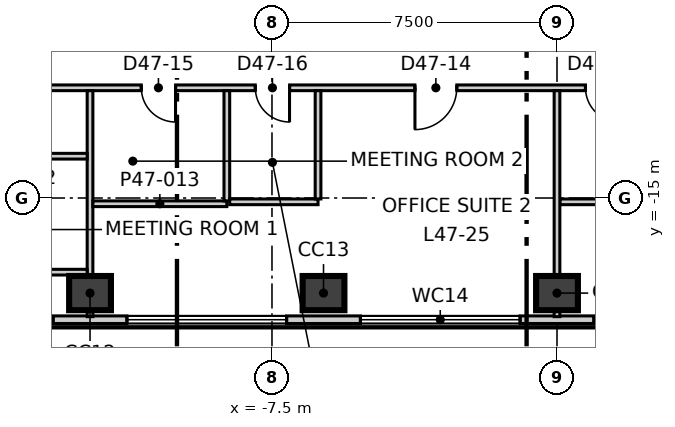
"""IFC4 building model, lengths in metres.
Left out: names, types, materials, properties, quantities, classifications, styles, units other than length and angle.
Written with IfcOpenShell. Run it as: python <this file> out.ifc"""

import sys

from ifc_helpers import new_model, si_unit, direction, frame, frame_2d, origin, origin_2d, place, context, subcontext, project, spatial, rectangle, extrude, element, fill, save


model = new_model("IFC4")
c1 = context("Model", 3, precision=1e-05, world=origin(), true_north=direction((0.0, 1.0)))
c2 = subcontext(c1, "Body", "Model", "MODEL_VIEW")
j1 = project(units=[si_unit("LENGTHUNIT", "METRE"), si_unit("PLANEANGLEUNIT", "RADIAN")], contexts=[c1])
p1 = place(None, origin())
s1 = spatial("IfcSite", under=j1, at=p1, CompositionType="ELEMENT")
p2 = place(p1, origin())
s2 = spatial("IfcBuilding", under=s1, at=p2, CompositionType="ELEMENT")
p3 = place(p2, frame((0.0, 0.0, 203.3)))
s3 = spatial("IfcBuildingStorey", under=s2, at=p3, CompositionType="ELEMENT", Elevation=203.3)
for number, where, z_axis, x_axis in (
    (1, (-12.288, -17.502, -0.3), (0.0, 0.0, 1.0), (1.0, 0.0, 0.0)),
    (2, (-6.144, -17.502, -0.3), (0.0, 0.0, 1.0), (1.0, 0.0, 0.0)),
    (3, (0.0, -17.502, -0.3), (0.0, 0.0, 1.0), (1.0, 0.0, 0.0)),
):
    element("IfcColumn", number, at=place(p3, frame(where, z_axis=z_axis, x_axis=x_axis)), inside=s3, PredefinedType="COLUMN", context=c2, shape_type="SweptSolid", body=[
        extrude(rectangle(XDim=1.1, YDim=0.9, at=origin_2d()), origin(), (0.0, 0.0, 1.0), 4.0),
    ])
p4 = place(p3, frame((-2.824, 31.513, 0.0), z_axis=(0.0, 0.0, 1.0), x_axis=(-0.500012324412, -0.866018288165, 0.0)))
e4 = element("IfcWall", 4, at=p4, inside=s3, PredefinedType="ELEMENTEDWALL", context=c2, shape_type="SweptSolid", body=[
    extrude(rectangle(XDim=51.739, YDim=0.2, at=frame_2d((25.87, 0.0))), origin(), (0.0, 0.0, 1.0), 3.7),
])
p5 = place(p4, frame((2.275, 0.0, 0.9)))
e5 = element("IfcOpeningElement", 5, at=p5, cuts=e4, PredefinedType="OPENING", context=c2, shape_type="SweptSolid", body=[
    extrude(rectangle(XDim=4.2, YDim=2.5, at=frame_2d((2.1, 1.25))), frame((0.0, 0.11, 0.0), z_axis=(0.0, -1.0, 0.0), x_axis=(1.0, 0.0, 0.0)), (0.0, 0.0, 1.0), 0.22),
])
p6 = place(p4, frame((8.419, 0.0, 0.9)))
e6 = element("IfcOpeningElement", 6, at=p6, cuts=e4, PredefinedType="OPENING", context=c2, shape_type="SweptSolid", body=[
    extrude(rectangle(XDim=4.2, YDim=2.5, at=frame_2d((2.1, 1.25))), frame((0.0, 0.11, 0.0), z_axis=(0.0, -1.0, 0.0), x_axis=(1.0, 0.0, 0.0)), (0.0, 0.0, 1.0), 0.22),
])
p7 = place(p4, frame((14.563, 0.0, 0.9)))
e7 = element("IfcOpeningElement", 7, at=p7, cuts=e4, PredefinedType="OPENING", context=c2, shape_type="SweptSolid", body=[
    extrude(rectangle(XDim=4.2, YDim=2.5, at=frame_2d((2.1, 1.25))), frame((0.0, 0.11, 0.0), z_axis=(0.0, -1.0, 0.0), x_axis=(1.0, 0.0, 0.0)), (0.0, 0.0, 1.0), 0.22),
])
p8 = place(p4, frame((20.707, 0.0, 0.9)))
e8 = element("IfcOpeningElement", 8, at=p8, cuts=e4, PredefinedType="OPENING", context=c2, shape_type="SweptSolid", body=[
    extrude(rectangle(XDim=4.2, YDim=2.5, at=frame_2d((2.1, 1.25))), frame((0.0, 0.11, 0.0), z_axis=(0.0, -1.0, 0.0), x_axis=(1.0, 0.0, 0.0)), (0.0, 0.0, 1.0), 0.22),
])
p9 = place(p4, frame((26.851, 0.0, 0.9)))
e9 = element("IfcOpeningElement", 9, at=p9, cuts=e4, PredefinedType="OPENING", context=c2, shape_type="SweptSolid", body=[
    extrude(rectangle(XDim=4.2, YDim=2.5, at=frame_2d((2.1, 1.25))), frame((0.0, 0.11, 0.0), z_axis=(0.0, -1.0, 0.0), x_axis=(1.0, 0.0, 0.0)), (0.0, 0.0, 1.0), 0.22),
])
p10 = place(p4, frame((32.995, 0.0, 0.9)))
e10 = element("IfcOpeningElement", 10, at=p10, cuts=e4, PredefinedType="OPENING", context=c2, shape_type="SweptSolid", body=[
    extrude(rectangle(XDim=4.2, YDim=2.5, at=frame_2d((2.1, 1.25))), frame((0.0, 0.11, 0.0), z_axis=(0.0, -1.0, 0.0), x_axis=(1.0, 0.0, 0.0)), (0.0, 0.0, 1.0), 0.22),
])
p11 = place(p4, frame((39.14, 0.0, 0.9)))
e11 = element("IfcOpeningElement", 11, at=p11, cuts=e4, PredefinedType="OPENING", context=c2, shape_type="SweptSolid", body=[
    extrude(rectangle(XDim=4.2, YDim=2.5, at=frame_2d((2.1, 1.25))), frame((0.0, 0.11, 0.0), z_axis=(0.0, -1.0, 0.0), x_axis=(1.0, 0.0, 0.0)), (0.0, 0.0, 1.0), 0.22),
])
p12 = place(p4, frame((45.284, 0.0, 0.9)))
e12 = element("IfcOpeningElement", 12, at=p12, cuts=e4, PredefinedType="OPENING", context=c2, shape_type="SweptSolid", body=[
    extrude(rectangle(XDim=4.2, YDim=2.5, at=frame_2d((2.1, 1.25))), frame((0.0, 0.11, 0.0), z_axis=(0.0, -1.0, 0.0), x_axis=(1.0, 0.0, 0.0)), (0.0, 0.0, 1.0), 0.22),
])
p13 = place(p3, frame((-25.88, -18.202, 0.0), z_axis=(0.0, 0.0, 1.0), x_axis=(1.0, 0.0, 0.0)))
e13 = element("IfcWall", 13, at=p13, inside=s3, PredefinedType="ELEMENTEDWALL", context=c2, shape_type="SweptSolid", body=[
    extrude(rectangle(XDim=51.74, YDim=0.2, at=frame_2d((25.87, 0.0))), origin(), (0.0, 0.0, 1.0), 3.7),
])
p14 = place(p13, frame((2.275, 0.0, 0.9)))
e14 = element("IfcOpeningElement", 14, at=p14, cuts=e13, PredefinedType="OPENING", context=c2, shape_type="SweptSolid", body=[
    extrude(rectangle(XDim=4.2, YDim=2.5, at=frame_2d((2.1, 1.25))), frame((0.0, 0.11, 0.0), z_axis=(0.0, -1.0, 0.0), x_axis=(1.0, 0.0, 0.0)), (0.0, 0.0, 1.0), 0.22),
])
p15 = place(p13, frame((8.419, 0.0, 0.9)))
e15 = element("IfcOpeningElement", 15, at=p15, cuts=e13, PredefinedType="OPENING", context=c2, shape_type="SweptSolid", body=[
    extrude(rectangle(XDim=4.2, YDim=2.5, at=frame_2d((2.1, 1.25))), frame((0.0, 0.11, 0.0), z_axis=(0.0, -1.0, 0.0), x_axis=(1.0, 0.0, 0.0)), (0.0, 0.0, 1.0), 0.22),
])
p16 = place(p13, frame((14.564, 0.0, 0.9)))
e16 = element("IfcOpeningElement", 16, at=p16, cuts=e13, PredefinedType="OPENING", context=c2, shape_type="SweptSolid", body=[
    extrude(rectangle(XDim=4.2, YDim=2.5, at=frame_2d((2.1, 1.25))), frame((0.0, 0.11, 0.0), z_axis=(0.0, -1.0, 0.0), x_axis=(1.0, 0.0, 0.0)), (0.0, 0.0, 1.0), 0.22),
])
p17 = place(p13, frame((20.708, 0.0, 0.9)))
e17 = element("IfcOpeningElement", 17, at=p17, cuts=e13, PredefinedType="OPENING", context=c2, shape_type="SweptSolid", body=[
    extrude(rectangle(XDim=4.2, YDim=2.5, at=frame_2d((2.1, 1.25))), frame((0.0, 0.11, 0.0), z_axis=(0.0, -1.0, 0.0), x_axis=(1.0, 0.0, 0.0)), (0.0, 0.0, 1.0), 0.22),
])
p18 = place(p13, frame((26.852, 0.0, 0.9)))
e18 = element("IfcOpeningElement", 18, at=p18, cuts=e13, PredefinedType="OPENING", context=c2, shape_type="SweptSolid", body=[
    extrude(rectangle(XDim=4.2, YDim=2.5, at=frame_2d((2.1, 1.25))), frame((0.0, 0.11, 0.0), z_axis=(0.0, -1.0, 0.0), x_axis=(1.0, 0.0, 0.0)), (0.0, 0.0, 1.0), 0.22),
])
p19 = place(p13, frame((32.996, 0.0, 0.9)))
e19 = element("IfcOpeningElement", 19, at=p19, cuts=e13, PredefinedType="OPENING", context=c2, shape_type="SweptSolid", body=[
    extrude(rectangle(XDim=4.2, YDim=2.5, at=frame_2d((2.1, 1.25))), frame((0.0, 0.11, 0.0), z_axis=(0.0, -1.0, 0.0), x_axis=(1.0, 0.0, 0.0)), (0.0, 0.0, 1.0), 0.22),
])
p20 = place(p13, frame((39.141, 0.0, 0.9)))
e20 = element("IfcOpeningElement", 20, at=p20, cuts=e13, PredefinedType="OPENING", context=c2, shape_type="SweptSolid", body=[
    extrude(rectangle(XDim=4.2, YDim=2.5, at=frame_2d((2.1, 1.25))), frame((0.0, 0.11, 0.0), z_axis=(0.0, -1.0, 0.0), x_axis=(1.0, 0.0, 0.0)), (0.0, 0.0, 1.0), 0.22),
])
p21 = place(p13, frame((45.285, 0.0, 0.9)))
e21 = element("IfcOpeningElement", 21, at=p21, cuts=e13, PredefinedType="OPENING", context=c2, shape_type="SweptSolid", body=[
    extrude(rectangle(XDim=4.2, YDim=2.5, at=frame_2d((2.1, 1.25))), frame((0.0, 0.11, 0.0), z_axis=(0.0, -1.0, 0.0), x_axis=(1.0, 0.0, 0.0)), (0.0, 0.0, 1.0), 0.22),
])
p22 = place(p3, frame((-20.883, -11.97, 0.0), z_axis=(0.0, 0.0, 1.0), x_axis=(0.500006150555, 0.866021852731, 0.0)))
e22 = element("IfcWall", 22, at=p22, inside=s3, PredefinedType="PARTITIONING", context=c2, shape_type="SweptSolid", body=[
    extrude(rectangle(XDim=41.766, YDim=0.15, at=frame_2d((20.883, 0.0))), origin(), (0.0, 0.0, 1.0), 3.7),
])
p23 = place(p22, frame((36.916, 0.0, 0.0)))
e23 = element("IfcOpeningElement", 23, at=p23, cuts=e22, PredefinedType="OPENING", context=c2, shape_type="SweptSolid", body=[
    extrude(rectangle(XDim=1.1, YDim=2.1, at=frame_2d((0.55, 1.05))), frame((0.0, 0.085, 0.0), z_axis=(0.0, -1.0, 0.0), x_axis=(1.0, 0.0, 0.0)), (0.0, 0.0, 1.0), 0.17),
])
p24 = place(p22, frame((26.446, 0.0, 0.0)))
e24 = element("IfcOpeningElement", 24, at=p24, cuts=e22, PredefinedType="OPENING", context=c2, shape_type="SweptSolid", body=[
    extrude(rectangle(XDim=1.1, YDim=2.1, at=frame_2d((0.55, 1.05))), frame((0.0, 0.085, 0.0), z_axis=(0.0, -1.0, 0.0), x_axis=(1.0, 0.0, 0.0)), (0.0, 0.0, 1.0), 0.17),
])
p25 = place(p22, frame((9.757, 0.0, 0.0)))
e25 = element("IfcOpeningElement", 25, at=p25, cuts=e22, PredefinedType="OPENING", context=c2, shape_type="SweptSolid", body=[
    extrude(rectangle(XDim=1.1, YDim=2.1, at=frame_2d((0.55, 1.05))), frame((0.0, 0.085, 0.0), z_axis=(0.0, -1.0, 0.0), x_axis=(1.0, 0.0, 0.0)), (0.0, 0.0, 1.0), 0.17),
])
p26 = place(p22, frame((18.757, 0.0, 0.0)))
e26 = element("IfcOpeningElement", 26, at=p26, cuts=e22, PredefinedType="OPENING", context=c2, shape_type="SweptSolid", body=[
    extrude(rectangle(XDim=0.9, YDim=2.1, at=frame_2d((0.45, 1.05))), frame((0.0, 0.085, 0.0), z_axis=(0.0, -1.0, 0.0), x_axis=(1.0, 0.0, 0.0)), (0.0, 0.0, 1.0), 0.17),
])
p27 = place(p22, frame((15.557, 0.0, 0.0)))
e27 = element("IfcOpeningElement", 27, at=p27, cuts=e22, PredefinedType="OPENING", context=c2, shape_type="SweptSolid", body=[
    extrude(rectangle(XDim=0.9, YDim=2.1, at=frame_2d((0.45, 1.05))), frame((0.0, 0.085, 0.0), z_axis=(0.0, -1.0, 0.0), x_axis=(1.0, 0.0, 0.0)), (0.0, 0.0, 1.0), 0.17),
])
p28 = place(p22, frame((12.657, 0.0, 0.0)))
e28 = element("IfcOpeningElement", 28, at=p28, cuts=e22, PredefinedType="OPENING", context=c2, shape_type="SweptSolid", body=[
    extrude(rectangle(XDim=1.0, YDim=2.1, at=frame_2d((0.5, 1.05))), frame((0.0, 0.085, 0.0), z_axis=(0.0, -1.0, 0.0), x_axis=(1.0, 0.0, 0.0)), (0.0, 0.0, 1.0), 0.17),
])
p29 = place(p22, frame((3.669, 0.0, 0.0)))
e29 = element("IfcOpeningElement", 29, at=p29, cuts=e22, PredefinedType="OPENING", context=c2, shape_type="SweptSolid", body=[
    extrude(rectangle(XDim=1.1, YDim=2.1, at=frame_2d((0.55, 1.05))), frame((0.0, 0.085, 0.0), z_axis=(0.0, -1.0, 0.0), x_axis=(1.0, 0.0, 0.0)), (0.0, 0.0, 1.0), 0.17),
])
p30 = place(p3, frame((-20.808, -12.1, 0.0), z_axis=(0.0, 0.0, 1.0), x_axis=(1.0, 0.0, 0.0)))
e30 = element("IfcWall", 30, at=p30, inside=s3, PredefinedType="PARTITIONING", context=c2, shape_type="SweptSolid", body=[
    extrude(rectangle(XDim=41.766, YDim=0.15, at=frame_2d((20.883, 0.0))), origin(), (0.0, 0.0, 1.0), 3.7),
])
p31 = place(p30, frame((3.6, 0.0, 0.0)))
e31 = element("IfcOpeningElement", 31, at=p31, cuts=e30, PredefinedType="OPENING", context=c2, shape_type="SweptSolid", body=[
    extrude(rectangle(XDim=1.1, YDim=2.1, at=frame_2d((0.55, 1.05))), frame((0.0, 0.085, 0.0), z_axis=(0.0, -1.0, 0.0), x_axis=(1.0, 0.0, 0.0)), (0.0, 0.0, 1.0), 0.17),
])
p32 = place(p30, frame((17.07, 0.0, 0.0)))
e32 = element("IfcOpeningElement", 32, at=p32, cuts=e30, PredefinedType="OPENING", context=c2, shape_type="SweptSolid", body=[
    extrude(rectangle(XDim=1.1, YDim=2.1, at=frame_2d((0.55, 1.05))), frame((0.0, 0.085, 0.0), z_axis=(0.0, -1.0, 0.0), x_axis=(1.0, 0.0, 0.0)), (0.0, 0.0, 1.0), 0.17),
])
p33 = place(p30, frame((9.87, 0.0, 0.0)))
e33 = element("IfcOpeningElement", 33, at=p33, cuts=e30, PredefinedType="OPENING", context=c2, shape_type="SweptSolid", body=[
    extrude(rectangle(XDim=0.9, YDim=2.1, at=frame_2d((0.45, 1.05))), frame((0.0, 0.085, 0.0), z_axis=(0.0, -1.0, 0.0), x_axis=(1.0, 0.0, 0.0)), (0.0, 0.0, 1.0), 0.17),
])
p34 = place(p30, frame((12.87, 0.0, 0.0)))
e34 = element("IfcOpeningElement", 34, at=p34, cuts=e30, PredefinedType="OPENING", context=c2, shape_type="SweptSolid", body=[
    extrude(rectangle(XDim=0.9, YDim=2.1, at=frame_2d((0.45, 1.05))), frame((0.0, 0.085, 0.0), z_axis=(0.0, -1.0, 0.0), x_axis=(1.0, 0.0, 0.0)), (0.0, 0.0, 1.0), 0.17),
])
p35 = place(p30, frame((27.658, 0.0, 0.0)))
e35 = element("IfcOpeningElement", 35, at=p35, cuts=e30, PredefinedType="OPENING", context=c2, shape_type="SweptSolid", body=[
    extrude(rectangle(XDim=1.0, YDim=2.1, at=frame_2d((0.5, 1.05))), frame((0.0, 0.085, 0.0), z_axis=(0.0, -1.0, 0.0), x_axis=(1.0, 0.0, 0.0)), (0.0, 0.0, 1.0), 0.17),
])
p36 = place(p30, frame((21.558, 0.0, 0.0)))
e36 = element("IfcOpeningElement", 36, at=p36, cuts=e30, PredefinedType="OPENING", context=c2, shape_type="SweptSolid", body=[
    extrude(rectangle(XDim=0.9, YDim=2.1, at=frame_2d((0.45, 1.05))), frame((0.0, 0.085, 0.0), z_axis=(0.0, -1.0, 0.0), x_axis=(1.0, 0.0, 0.0)), (0.0, 0.0, 1.0), 0.17),
])
p37 = place(p30, frame((36.847, 0.0, 0.0)))
e37 = element("IfcOpeningElement", 37, at=p37, cuts=e30, PredefinedType="OPENING", context=c2, shape_type="SweptSolid", body=[
    extrude(rectangle(XDim=1.1, YDim=2.1, at=frame_2d((0.55, 1.05))), frame((0.0, 0.085, 0.0), z_axis=(0.0, -1.0, 0.0), x_axis=(1.0, 0.0, 0.0)), (0.0, 0.0, 1.0), 0.17),
])
p38 = place(p3, frame((-12.288, -18.122, 0.0), z_axis=(0.0, 0.0, 1.0), x_axis=(0.0, 1.0, 0.0)))
e38 = element("IfcWall", 38, at=p38, inside=s3, PredefinedType="PARTITIONING", context=c2, shape_type="SweptSolid", body=[
    extrude(rectangle(XDim=5.947, YDim=0.15, at=frame_2d((2.974, 0.0))), origin(), (0.0, 0.0, 1.0), 3.7),
])
p39 = place(p3, frame((-12.213, -15.151, 0.0), z_axis=(0.0, 0.0, 1.0), x_axis=(1.0, 0.0, 0.0)))
e39 = element("IfcWall", 39, at=p39, inside=s3, PredefinedType="PARTITIONING", context=c2, shape_type="SweptSolid", body=[
    extrude(rectangle(XDim=3.525, YDim=0.15, at=frame_2d((1.762, 0.0))), origin(), (0.0, 0.0, 1.0), 3.7),
])
p40 = place(p3, frame((-8.688, -15.076, 0.0), z_axis=(0.0, 0.0, 1.0), x_axis=(0.0, 1.0, 0.0)))
e40 = element("IfcWall", 40, at=p40, inside=s3, PredefinedType="PARTITIONING", context=c2, shape_type="SweptSolid", body=[
    extrude(rectangle(XDim=2.901, YDim=0.15, at=frame_2d((1.45, 0.0))), origin(), (0.0, 0.0, 1.0), 3.7),
])
for number, where, z_axis, x_axis in (
    (41, (-8.613, -15.1, 0.0), (0.0, 0.0, 1.0), (1.0, 0.0, 0.0)),
    (42, (0.075, -15.1, 0.0), (0.0, 0.0, 1.0), (1.0, 0.0, 0.0)),
):
    element("IfcWall", number, at=place(p3, frame(where, z_axis=z_axis, x_axis=x_axis)), inside=s3, PredefinedType="PARTITIONING", context=c2, shape_type="SweptSolid", body=[
        extrude(rectangle(XDim=2.325, YDim=0.15, at=frame_2d((1.163, 0.0))), origin(), (0.0, 0.0, 1.0), 3.7),
    ])
p41 = place(p3, frame((-6.288, -15.025, 0.0), z_axis=(0.0, 0.0, 1.0), x_axis=(0.0, 1.0, 0.0)))
e43 = element("IfcWall", 43, at=p41, inside=s3, PredefinedType="PARTITIONING", context=c2, shape_type="SweptSolid", body=[
    extrude(rectangle(XDim=2.85, YDim=0.15, at=frame_2d((1.425, 0.0))), origin(), (0.0, 0.0, 1.0), 3.7),
])
p42 = place(p3, frame((0.0, -18.122, 0.0), z_axis=(0.0, 0.0, 1.0), x_axis=(0.0, 1.0, 0.0)))
e44 = element("IfcWall", 44, at=p42, inside=s3, PredefinedType="PARTITIONING", context=c2, shape_type="SweptSolid", body=[
    extrude(rectangle(XDim=5.947, YDim=0.15, at=frame_2d((2.974, 0.0))), origin(), (0.0, 0.0, 1.0), 3.2),
])
p43 = place(p3, frame((0.075, 24.07, 0.0), z_axis=(0.0, 0.0, 1.0), x_axis=(0.500006834213, -0.866021458014, 0.0)))
e45 = element("IfcWall", 45, at=p43, inside=s3, PredefinedType="PARTITIONING", context=c2, shape_type="SweptSolid", body=[
    extrude(rectangle(XDim=41.616, YDim=0.15, at=frame_2d((20.808, 0.0))), origin(), (0.0, 0.0, 1.0), 3.7),
])
p44 = place(p43, frame((36.915, 0.0, 0.0)))
e46 = element("IfcOpeningElement", 46, at=p44, cuts=e45, PredefinedType="OPENING", context=c2, shape_type="SweptSolid", body=[
    extrude(rectangle(XDim=1.1, YDim=2.1, at=frame_2d((0.55, 1.05))), frame((0.0, 0.085, 0.0), z_axis=(0.0, -1.0, 0.0), x_axis=(1.0, 0.0, 0.0)), (0.0, 0.0, 1.0), 0.17),
])
p45 = place(p43, frame((22.046, 0.0, 0.0)))
e47 = element("IfcOpeningElement", 47, at=p45, cuts=e45, PredefinedType="OPENING", context=c2, shape_type="SweptSolid", body=[
    extrude(rectangle(XDim=1.1, YDim=2.1, at=frame_2d((0.55, 1.05))), frame((0.0, 0.085, 0.0), z_axis=(0.0, -1.0, 0.0), x_axis=(1.0, 0.0, 0.0)), (0.0, 0.0, 1.0), 0.17),
])
p46 = place(p43, frame((31.046, 0.0, 0.0)))
e48 = element("IfcOpeningElement", 48, at=p46, cuts=e45, PredefinedType="OPENING", context=c2, shape_type="SweptSolid", body=[
    extrude(rectangle(XDim=0.9, YDim=2.1, at=frame_2d((0.45, 1.05))), frame((0.0, 0.085, 0.0), z_axis=(0.0, -1.0, 0.0), x_axis=(1.0, 0.0, 0.0)), (0.0, 0.0, 1.0), 0.17),
])
p47 = place(p43, frame((27.846, 0.0, 0.0)))
e49 = element("IfcOpeningElement", 49, at=p47, cuts=e45, PredefinedType="OPENING", context=c2, shape_type="SweptSolid", body=[
    extrude(rectangle(XDim=0.9, YDim=2.1, at=frame_2d((0.45, 1.05))), frame((0.0, 0.085, 0.0), z_axis=(0.0, -1.0, 0.0), x_axis=(1.0, 0.0, 0.0)), (0.0, 0.0, 1.0), 0.17),
])
p48 = place(p43, frame((24.946, 0.0, 0.0)))
e50 = element("IfcOpeningElement", 50, at=p48, cuts=e45, PredefinedType="OPENING", context=c2, shape_type="SweptSolid", body=[
    extrude(rectangle(XDim=1.0, YDim=2.1, at=frame_2d((0.5, 1.05))), frame((0.0, 0.085, 0.0), z_axis=(0.0, -1.0, 0.0), x_axis=(1.0, 0.0, 0.0)), (0.0, 0.0, 1.0), 0.17),
])
p49 = place(p43, frame((17.258, 0.0, 0.0)))
e51 = element("IfcOpeningElement", 51, at=p49, cuts=e45, PredefinedType="OPENING", context=c2, shape_type="SweptSolid", body=[
    extrude(rectangle(XDim=1.0, YDim=2.1, at=frame_2d((0.5, 1.05))), frame((0.0, 0.085, 0.0), z_axis=(0.0, -1.0, 0.0), x_axis=(1.0, 0.0, 0.0)), (0.0, 0.0, 1.0), 0.17),
])
p50 = place(p43, frame((11.114, 0.0, 0.0)))
e52 = element("IfcOpeningElement", 52, at=p50, cuts=e45, PredefinedType="OPENING", context=c2, shape_type="SweptSolid", body=[
    extrude(rectangle(XDim=1.0, YDim=2.1, at=frame_2d((0.5, 1.05))), frame((0.0, 0.085, 0.0), z_axis=(0.0, -1.0, 0.0), x_axis=(1.0, 0.0, 0.0)), (0.0, 0.0, 1.0), 0.17),
])
p51 = place(p43, frame((3.669, 0.0, 0.0)))
e53 = element("IfcOpeningElement", 53, at=p51, cuts=e45, PredefinedType="OPENING", context=c2, shape_type="SweptSolid", body=[
    extrude(rectangle(XDim=1.0, YDim=2.1, at=frame_2d((0.5, 1.05))), frame((0.0, 0.085, 0.0), z_axis=(0.0, -1.0, 0.0), x_axis=(1.0, 0.0, 0.0)), (0.0, 0.0, 1.0), 0.17),
])
p52 = place(p3, frame((-18.088, -13.9, 0.0), z_axis=(0.0, 0.0, 1.0), x_axis=(1.0, 0.0, 0.0)))
e54 = element("IfcWall", 54, at=p52, inside=s3, PredefinedType="PARTITIONING", context=c2, shape_type="SweptSolid", body=[
    extrude(rectangle(XDim=5.725, YDim=0.15, at=frame_2d((2.862, 0.0))), origin(), (0.0, 0.0, 1.0), 3.7),
])
p53 = place(p52, frame((3.55, 0.0, 0.0)))
e55 = element("IfcOpeningElement", 55, at=p53, cuts=e54, PredefinedType="OPENING", context=c2, shape_type="SweptSolid", body=[
    extrude(rectangle(XDim=0.9, YDim=2.1, at=frame_2d((0.45, 1.05))), frame((0.0, 0.085, 0.0), z_axis=(0.0, -1.0, 0.0), x_axis=(1.0, 0.0, 0.0)), (0.0, 0.0, 1.0), 0.17),
])
p54 = place(p3, frame((-15.813, -16.951, 0.0), z_axis=(0.0, 0.0, 1.0), x_axis=(1.0, 0.0, 0.0)))
e56 = element("IfcWall", 56, at=p54, inside=s3, PredefinedType="PARTITIONING", context=c2, shape_type="SweptSolid", body=[
    extrude(rectangle(XDim=3.45, YDim=0.15, at=frame_2d((1.725, 0.0))), origin(), (0.0, 0.0, 1.0), 3.7),
])
p55 = place(p15, origin())
e57 = element("IfcWindow", 57, at=p55, inside=s3, PartitioningType="SINGLE_PANEL", PredefinedType="WINDOW", context=c2, shape_type="SweptSolid", body=[
    extrude(rectangle(XDim=4.2, YDim=2.5, at=frame_2d((2.1, 1.25))), frame((0.0, 0.03, 0.0), z_axis=(0.0, -1.0, 0.0), x_axis=(1.0, 0.0, 0.0)), (0.0, 0.0, 1.0), 0.06),
])
fill(e15, e57)
p56 = place(p16, origin())
e58 = element("IfcWindow", 58, at=p56, inside=s3, PartitioningType="SINGLE_PANEL", PredefinedType="WINDOW", context=c2, shape_type="SweptSolid", body=[
    extrude(rectangle(XDim=4.2, YDim=2.5, at=frame_2d((2.1, 1.25))), frame((0.0, 0.03, 0.0), z_axis=(0.0, -1.0, 0.0), x_axis=(1.0, 0.0, 0.0)), (0.0, 0.0, 1.0), 0.06),
])
fill(e16, e58)
p57 = place(p17, origin())
e59 = element("IfcWindow", 59, at=p57, inside=s3, PartitioningType="SINGLE_PANEL", PredefinedType="WINDOW", context=c2, shape_type="SweptSolid", body=[
    extrude(rectangle(XDim=4.2, YDim=2.5, at=frame_2d((2.1, 1.25))), frame((0.0, 0.03, 0.0), z_axis=(0.0, -1.0, 0.0), x_axis=(1.0, 0.0, 0.0)), (0.0, 0.0, 1.0), 0.06),
])
fill(e17, e59)
p58 = place(p18, origin())
e60 = element("IfcWindow", 60, at=p58, inside=s3, PartitioningType="SINGLE_PANEL", PredefinedType="WINDOW", context=c2, shape_type="SweptSolid", body=[
    extrude(rectangle(XDim=4.2, YDim=2.5, at=frame_2d((2.1, 1.25))), frame((0.0, 0.03, 0.0), z_axis=(0.0, -1.0, 0.0), x_axis=(1.0, 0.0, 0.0)), (0.0, 0.0, 1.0), 0.06),
])
fill(e18, e60)
p59 = place(p32, origin())
e61 = element("IfcDoor", 61, at=p59, inside=s3, OperationType="SINGLE_SWING_LEFT", PredefinedType="DOOR", context=c2, shape_type="SweptSolid", body=[
    extrude(rectangle(XDim=1.1, YDim=2.1, at=frame_2d((0.55, 1.05))), frame((0.0, 0.025, 0.0), z_axis=(0.0, -1.0, 0.0), x_axis=(1.0, 0.0, 0.0)), (0.0, 0.0, 1.0), 0.05),
])
fill(e32, e61)
p60 = place(p33, origin())
e62 = element("IfcDoor", 62, at=p60, inside=s3, OperationType="SINGLE_SWING_RIGHT", PredefinedType="DOOR", context=c2, shape_type="SweptSolid", body=[
    extrude(rectangle(XDim=0.9, YDim=2.1, at=frame_2d((0.45, 1.05))), frame((0.0, 0.025, 0.0), z_axis=(0.0, -1.0, 0.0), x_axis=(1.0, 0.0, 0.0)), (0.0, 0.0, 1.0), 0.05),
])
fill(e33, e62)
p61 = place(p34, origin())
e63 = element("IfcDoor", 63, at=p61, inside=s3, OperationType="SINGLE_SWING_RIGHT", PredefinedType="DOOR", context=c2, shape_type="SweptSolid", body=[
    extrude(rectangle(XDim=0.9, YDim=2.1, at=frame_2d((0.45, 1.05))), frame((0.0, 0.025, 0.0), z_axis=(0.0, -1.0, 0.0), x_axis=(1.0, 0.0, 0.0)), (0.0, 0.0, 1.0), 0.05),
])
fill(e34, e63)
p62 = place(p36, origin())
e64 = element("IfcDoor", 64, at=p62, inside=s3, OperationType="SINGLE_SWING_RIGHT", PredefinedType="DOOR", context=c2, shape_type="SweptSolid", body=[
    extrude(rectangle(XDim=0.9, YDim=2.1, at=frame_2d((0.45, 1.05))), frame((0.0, 0.025, 0.0), z_axis=(0.0, -1.0, 0.0), x_axis=(1.0, 0.0, 0.0)), (0.0, 0.0, 1.0), 0.05),
])
fill(e36, e64)
save(model, sys.argv[1])
